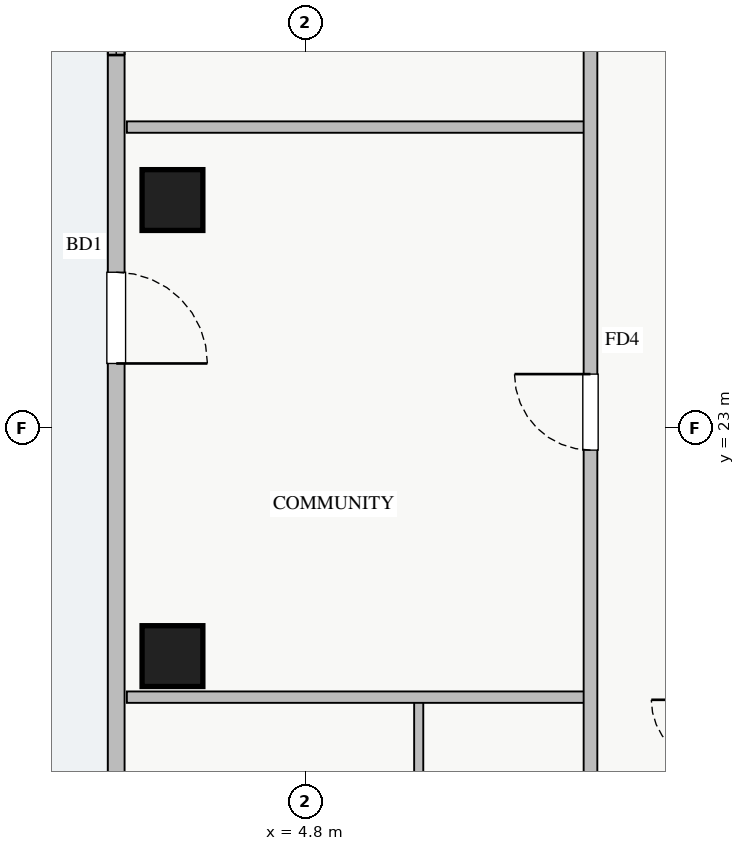
"""IFC4 building model, lengths in metres.
Left out: names, types, materials, properties, quantities, classifications, styles, units other than length and angle.
Written with IfcOpenShell. Run it as: python <this file> out.ifc"""

import sys

from ifc_helpers import new_model, si_unit, direction, frame, frame_2d, origin, origin_2d, place, context, subcontext, project, spatial, rectangle, extrude, source, transform, mapped, element, fill, save


model = new_model("IFC4")
c1 = context("Model", 3, precision=1e-05, world=origin(), true_north=direction((0.0, 1.0)))
c2 = subcontext(c1, "Body", "Model", "MODEL_VIEW")
j1 = project(units=[si_unit("LENGTHUNIT", "METRE"), si_unit("PLANEANGLEUNIT", "RADIAN")], contexts=[c1])
p1 = place(None, origin())
s1 = spatial("IfcSite", under=j1, at=p1, CompositionType="ELEMENT")
p2 = place(p1, origin())
s2 = spatial("IfcBuilding", under=s1, at=p2, CompositionType="ELEMENT")
p3 = place(p2, frame((0.0, 0.0, 206.75)))
s3 = spatial("IfcBuildingStorey", under=s2, at=p3, CompositionType="ELEMENT", Elevation=206.75)
m1 = source(origin(), c2, "Body", "SweptSolid", [
    extrude(rectangle(XDim=0.8, YDim=0.8, at=origin_2d()), origin(), (0.0, 0.0, 1.0), 3.25),
])
for number, where, z_axis, x_axis in (
    (1, (3.05, 26.0, 0.0), (0.0, 0.0, 1.0), (1.0, 0.0, 0.0)),
    (2, (3.05, 20.0, 0.0), (0.0, 0.0, 1.0), (1.0, 0.0, 0.0)),
):
    element("IfcColumn", number, at=place(p3, frame(where, z_axis=z_axis, x_axis=x_axis)), inside=s3, PredefinedType="COLUMN", context=c2, shape_type="MappedRepresentation", body=[
        mapped(m1, transform((0.0, 0.0, 0.0), x_axis=(1.0, 0.0, 0.0), y_axis=(0.0, 1.0, 0.0), z_axis=(0.0, 0.0, 1.0), scale=1.0)),
    ])
p4 = place(p3, frame((2.31, 11.65, 0.0), z_axis=(0.0, 0.0, 1.0), x_axis=(0.0, 1.0, 0.0)))
e3 = element("IfcWall", 3, at=p4, inside=s3, PredefinedType="STANDARD", context=c2, shape_type="SweptSolid", body=[
    extrude(rectangle(XDim=22.7, YDim=0.22, at=frame_2d((11.35, 0.0))), origin(), (0.0, 0.0, 1.0), 2.61),
])
p5 = place(p4, frame((12.2, 0.0, 0.0)))
e4 = element("IfcOpeningElement", 4, at=p5, cuts=e3, PredefinedType="OPENING", context=c2, shape_type="SweptSolid", body=[
    extrude(rectangle(XDim=1.2, YDim=2.1, at=frame_2d((0.6, 1.05))), frame((0.0, 0.12, 0.0), z_axis=(0.0, -1.0, 0.0), x_axis=(1.0, 0.0, 0.0)), (0.0, 0.0, 1.0), 0.24),
])
p6 = place(p4, frame((0.8, 0.0, 0.9)))
e5 = element("IfcOpeningElement", 5, at=p6, cuts=e3, PredefinedType="OPENING", context=c2, shape_type="SweptSolid", body=[
    extrude(rectangle(XDim=2.4, YDim=1.5, at=frame_2d((1.2, 0.75))), frame((0.0, 0.12, 0.0), z_axis=(0.0, -1.0, 0.0), x_axis=(1.0, 0.0, 0.0)), (0.0, 0.0, 1.0), 0.24),
])
p7 = place(p4, frame((20.08, 0.0, 0.9)))
e6 = element("IfcOpeningElement", 6, at=p7, cuts=e3, PredefinedType="OPENING", context=c2, shape_type="SweptSolid", body=[
    extrude(rectangle(XDim=2.1, YDim=1.5, at=frame_2d((1.05, 0.75))), frame((0.0, 0.12, 0.0), z_axis=(0.0, -1.0, 0.0), x_axis=(1.0, 0.0, 0.0)), (0.0, 0.0, 1.0), 0.24),
])
p8 = place(p4, frame((16.258, 0.0, 0.9)))
e7 = element("IfcOpeningElement", 7, at=p8, cuts=e3, PredefinedType="OPENING", context=c2, shape_type="SweptSolid", body=[
    extrude(rectangle(XDim=2.4, YDim=1.5, at=frame_2d((1.2, 0.75))), frame((0.0, 0.12, 0.0), z_axis=(0.0, -1.0, 0.0), x_axis=(1.0, 0.0, 0.0)), (0.0, 0.0, 1.0), 0.24),
])
p9 = place(p3, frame((6.29, 15.62, 0.0), z_axis=(0.0, 0.0, 1.0), x_axis=(0.0, 1.0, 0.0)))
e8 = element("IfcWall", 8, at=p9, inside=s3, PredefinedType="PLUMBINGWALL", context=c2, shape_type="SweptSolid", body=[
    extrude(rectangle(XDim=3.84, YDim=0.12, at=frame_2d((1.92, 0.0))), origin(), (0.0, 0.0, 1.0), 3.07),
])
for number, where, z_axis, x_axis in (
    (9, (2.45, 19.46, 0.0), (0.0, 0.0, 1.0), (1.0, 0.0, 0.0)),
    (10, (2.45, 26.96, 0.0), (0.0, 0.0, 1.0), (1.0, 0.0, 0.0)),
):
    element("IfcWall", number, at=place(p3, frame(where, z_axis=z_axis, x_axis=x_axis)), inside=s3, PredefinedType="PARTITIONING", context=c2, shape_type="SweptSolid", body=[
        extrude(rectangle(XDim=6.1, YDim=0.15, at=frame_2d((3.05, 0.0))), origin(), (0.0, 0.0, 1.0), 3.07),
    ])
p10 = place(p3, frame((8.55, 6.2, 0.0), z_axis=(0.0, 0.0, 1.0), x_axis=(0.0, 1.0, 0.0)))
e11 = element("IfcWall", 11, at=p10, inside=s3, PredefinedType="PARTITIONING", context=c2, shape_type="SweptSolid", body=[
    extrude(rectangle(XDim=33.6, YDim=0.18, at=frame_2d((16.8, 0.0))), origin(), (0.0, 0.0, 1.0), 3.07),
])
p11 = place(p10, frame((29.605, 0.0, 0.0)))
e12 = element("IfcOpeningElement", 12, at=p11, cuts=e11, PredefinedType="OPENING", context=c2, shape_type="SweptSolid", body=[
    extrude(rectangle(XDim=0.9, YDim=2.05, at=frame_2d((0.45, 1.025))), frame((0.0, 0.1, 0.0), z_axis=(0.0, -1.0, 0.0), x_axis=(1.0, 0.0, 0.0)), (0.0, 0.0, 1.0), 0.2),
])
p12 = place(p10, frame((2.92, 0.0, 0.0)))
e13 = element("IfcOpeningElement", 13, at=p12, cuts=e11, PredefinedType="OPENING", context=c2, shape_type="SweptSolid", body=[
    extrude(rectangle(XDim=0.9, YDim=2.05, at=frame_2d((0.45, 1.025))), frame((0.0, 0.1, 0.0), z_axis=(0.0, -1.0, 0.0), x_axis=(1.0, 0.0, 0.0)), (0.0, 0.0, 1.0), 0.2),
])
p13 = place(p10, frame((6.48, 0.0, 0.0)))
e14 = element("IfcOpeningElement", 14, at=p13, cuts=e11, PredefinedType="OPENING", context=c2, shape_type="SweptSolid", body=[
    extrude(rectangle(XDim=1.0, YDim=2.05, at=frame_2d((0.5, 1.025))), frame((0.0, 0.1, 0.0), z_axis=(0.0, -1.0, 0.0), x_axis=(1.0, 0.0, 0.0)), (0.0, 0.0, 1.0), 0.2),
])
p14 = place(p10, frame((16.51, 0.0, 0.0)))
e15 = element("IfcOpeningElement", 15, at=p14, cuts=e11, PredefinedType="OPENING", context=c2, shape_type="SweptSolid", body=[
    extrude(rectangle(XDim=1.0, YDim=2.05, at=frame_2d((0.5, 1.025))), frame((0.0, 0.1, 0.0), z_axis=(0.0, -1.0, 0.0), x_axis=(1.0, 0.0, 0.0)), (0.0, 0.0, 1.0), 0.2),
])
p15 = place(p10, frame((22.21, 0.0, 0.0)))
e16 = element("IfcOpeningElement", 16, at=p15, cuts=e11, PredefinedType="OPENING", context=c2, shape_type="SweptSolid", body=[
    extrude(rectangle(XDim=1.0, YDim=2.05, at=frame_2d((0.5, 1.025))), frame((0.0, 0.1, 0.0), z_axis=(0.0, -1.0, 0.0), x_axis=(1.0, 0.0, 0.0)), (0.0, 0.0, 1.0), 0.2),
])
m2 = source(origin(), c2, "Body", "SweptSolid", [
    extrude(rectangle(XDim=1.2, YDim=2.1, at=frame_2d((0.6, 1.05))), frame((0.0, 0.025, 0.0), z_axis=(0.0, -1.0, 0.0), x_axis=(1.0, 0.0, 0.0)), (0.0, 0.0, 1.0), 0.05),
])
p16 = place(p5, frame((1.2, 0.0, 0.0), z_axis=(0.0, 0.0, 1.0), x_axis=(-1.0, 0.0, 0.0)))
e17 = element("IfcDoor", 17, at=p16, inside=s3, OperationType="SINGLE_SWING_LEFT", PredefinedType="DOOR", context=c2, shape_type="MappedRepresentation", body=[
    mapped(m2, transform((0.0, 0.0, 0.0), x_axis=(1.0, 0.0, 0.0), y_axis=(0.0, 1.0, 0.0), z_axis=(0.0, 0.0, 1.0), scale=1.0)),
])
fill(e4, e17)
m3 = source(origin(), c2, "Body", "SweptSolid", [
    extrude(rectangle(XDim=1.0, YDim=2.05, at=frame_2d((0.5, 1.025))), frame((0.0, 0.025, 0.0), z_axis=(0.0, -1.0, 0.0), x_axis=(1.0, 0.0, 0.0)), (0.0, 0.0, 1.0), 0.05),
])
p17 = place(p14, origin())
e18 = element("IfcDoor", 18, at=p17, inside=s3, OperationType="SINGLE_SWING_RIGHT", PredefinedType="DOOR", context=c2, shape_type="MappedRepresentation", body=[
    mapped(m3, transform((0.0, 0.0, 0.0), x_axis=(1.0, 0.0, 0.0), y_axis=(0.0, 1.0, 0.0), z_axis=(0.0, 0.0, 1.0), scale=1.0)),
])
fill(e15, e18)
m4 = source(origin(), c2, "Body", "SweptSolid", [
    extrude(rectangle(XDim=2.4, YDim=1.5, at=frame_2d((1.2, 0.75))), frame((0.0, 0.03, 0.0), z_axis=(0.0, -1.0, 0.0), x_axis=(1.0, 0.0, 0.0)), (0.0, 0.0, 1.0), 0.06),
])
p18 = place(p8, origin())
e19 = element("IfcWindow", 19, at=p18, inside=s3, PartitioningType="TRIPLE_PANEL_VERTICAL", PredefinedType="WINDOW", context=c2, shape_type="MappedRepresentation", body=[
    mapped(m4, transform((0.0, 0.0, 0.0), x_axis=(1.0, 0.0, 0.0), y_axis=(0.0, 1.0, 0.0), z_axis=(0.0, 0.0, 1.0), scale=1.0)),
])
fill(e7, e19)
save(model, sys.argv[1])
